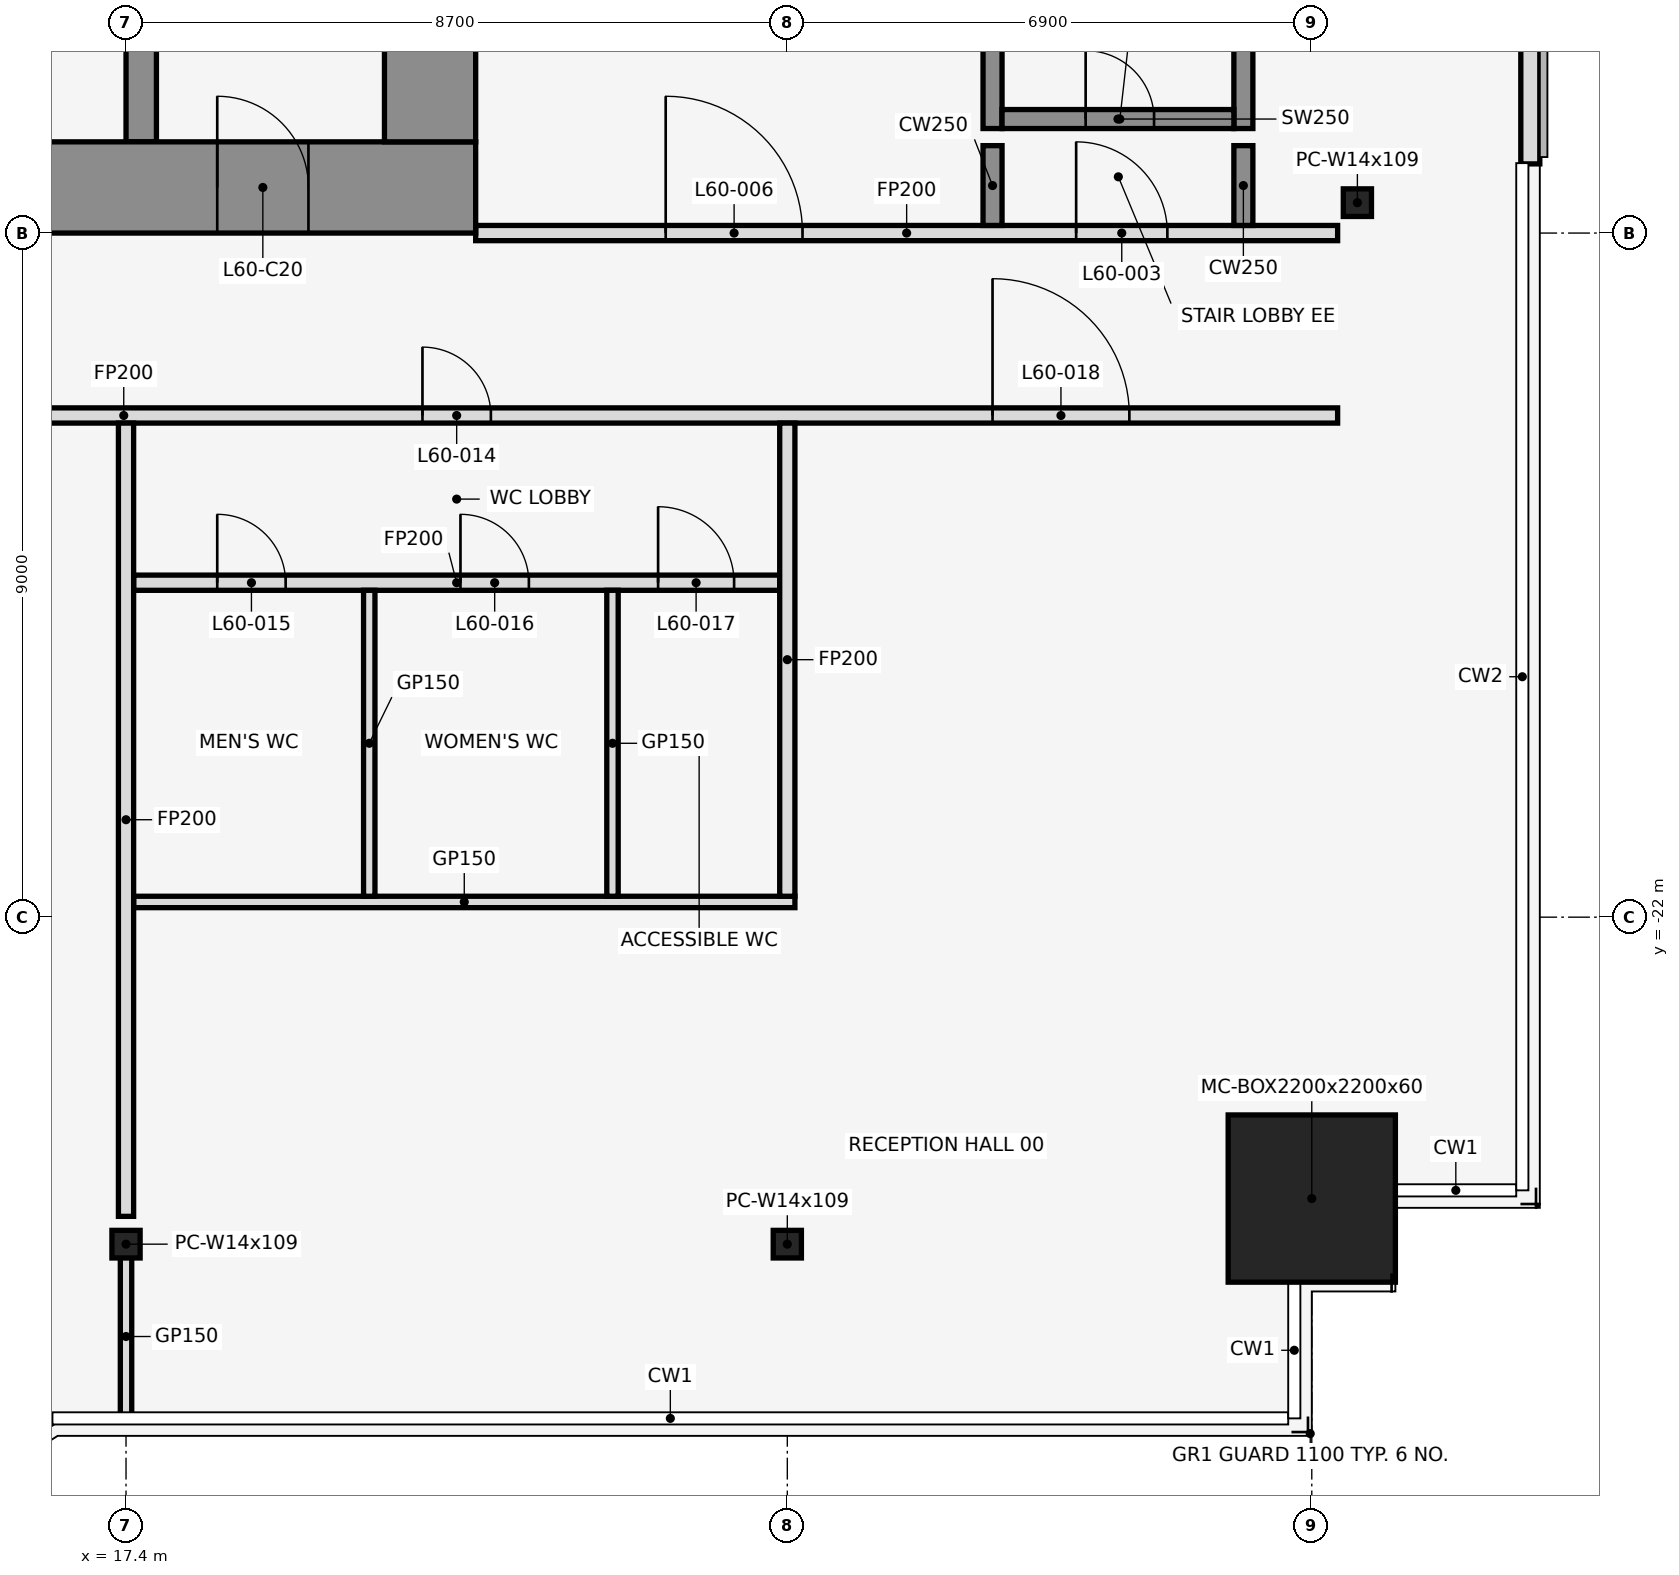
"""IFC4 building model, lengths in metres.
Left out: names, types, materials, properties, quantities, classifications, styles, units other than length and angle.
Written with IfcOpenShell. Run it as: python <this file> out.ifc"""

import sys

from ifc_helpers import new_model, si_unit, direction, frame, frame_2d, origin, origin_2d, place, context, subcontext, project, spatial, rectangle, hollow_rectangle, i_section, extrude, element, fill, save


model = new_model("IFC4")
c1 = context("Model", 3, precision=1e-05, world=origin(), true_north=direction((0.0, 1.0)))
c2 = subcontext(c1, "Body", "Model", "MODEL_VIEW")
j1 = project(units=[si_unit("LENGTHUNIT", "METRE"), si_unit("PLANEANGLEUNIT", "RADIAN")], contexts=[c1])
p1 = place(None, origin())
s1 = spatial("IfcSite", under=j1, at=p1, CompositionType="ELEMENT")
p2 = place(p1, origin())
s2 = spatial("IfcBuilding", under=s1, at=p2, CompositionType="ELEMENT")
p3 = place(p2, frame((0.0, 0.0, 266.6)))
s3 = spatial("IfcBuildingStorey", under=s2, at=p3, CompositionType="ELEMENT", Elevation=266.6)
for number, where, z_axis, x_axis in (
    (1, (17.4, -26.302, 0.0), (0.0, 0.0, 1.0), (1.0, 0.0, 0.0)),
    (2, (26.1, -26.302, 0.0), (0.0, 0.0, 1.0), (1.0, 0.0, 0.0)),
):
    element("IfcColumn", number, at=place(p3, frame(where, z_axis=z_axis, x_axis=x_axis)), inside=s3, PredefinedType="COLUMN", context=c2, shape_type="SweptSolid", body=[
        extrude(i_section(OverallWidth=0.371, OverallDepth=0.363, WebThickness=0.013, FlangeThickness=0.022, at=origin_2d()), origin(), (0.0, 0.0, 1.0), 4.2),
    ])
p4 = place(p3, frame((33.0, -25.702, 0.0), z_axis=(0.0, 0.0, 1.0), x_axis=(1.0, 0.0, 0.0)))
e3 = element("IfcColumn", 3, at=p4, inside=s3, PredefinedType="COLUMN", context=c2, shape_type="SweptSolid", body=[
    extrude(hollow_rectangle(XDim=2.2, YDim=2.2, WallThickness=0.06, at=origin_2d()), origin(), (0.0, 0.0, 1.0), 4.2),
])
p5 = place(p3, frame((33.6, -12.6, 0.0), z_axis=(0.0, 0.0, 1.0), x_axis=(1.0, 0.0, 0.0)))
e4 = element("IfcColumn", 4, at=p5, inside=s3, PredefinedType="COLUMN", context=c2, shape_type="SweptSolid", body=[
    extrude(i_section(OverallWidth=0.371, OverallDepth=0.363, WebThickness=0.013, FlangeThickness=0.022, at=origin_2d()), origin(), (0.0, 0.0, 1.0), 4.2),
])
p6 = place(p3, frame((35.875, -12.09, 0.0), z_axis=(0.0, 0.0, 1.0), x_axis=(0.0, 1.0, 0.0)))
e5 = element("IfcWall", 5, at=p6, inside=s3, PredefinedType="STANDARD", context=c2, shape_type="SweptSolid", body=[
    extrude(rectangle(XDim=9.09, YDim=0.25, at=frame_2d((4.545, 0.0))), origin(), (0.0, 0.0, 1.0), 4.05),
])
p7 = place(p3, frame((28.8, -11.625, 0.0), z_axis=(0.0, 0.0, 1.0), x_axis=(0.0, 1.0, 0.0)))
e6 = element("IfcWall", 6, at=p7, inside=s3, PredefinedType="SHEAR", context=c2, shape_type="SweptSolid", body=[
    extrude(rectangle(XDim=7.25, YDim=0.25, at=frame_2d((3.625, 0.0))), origin(), (0.0, 0.0, 1.0), 4.2),
])
p8 = place(p3, frame((32.1, -11.625, 0.0), z_axis=(0.0, 0.0, 1.0), x_axis=(0.0, 1.0, 0.0)))
e7 = element("IfcWall", 7, at=p8, inside=s3, PredefinedType="SHEAR", context=c2, shape_type="SweptSolid", body=[
    extrude(rectangle(XDim=7.525, YDim=0.25, at=frame_2d((3.762, 0.0))), origin(), (0.0, 0.0, 1.0), 4.2),
])
p9 = place(p3, frame((28.925, -11.5, 0.0), z_axis=(0.0, 0.0, 1.0), x_axis=(1.0, 0.0, 0.0)))
e8 = element("IfcWall", 8, at=p9, inside=s3, PredefinedType="SHEAR", context=c2, shape_type="SweptSolid", body=[
    extrude(rectangle(XDim=3.05, YDim=0.25, at=frame_2d((1.525, 0.0))), origin(), (0.0, 0.0, 1.0), 4.2),
])
p10 = place(p9, frame((1.1, 0.0, 0.0)))
e9 = element("IfcOpeningElement", 9, at=p10, cuts=e8, PredefinedType="OPENING", context=c2, shape_type="SweptSolid", body=[
    extrude(rectangle(XDim=0.9, YDim=2.1, at=frame_2d((0.45, 1.05))), frame((0.0, 0.137, 0.0), z_axis=(0.0, -1.0, 0.0), x_axis=(1.0, 0.0, 0.0)), (0.0, 0.0, 1.0), 0.274),
])
p11 = place(p3, frame((17.5, -21.8, 0.0), z_axis=(0.0, 0.0, 1.0), x_axis=(1.0, 0.0, 0.0)))
e10 = element("IfcWall", 10, at=p11, inside=s3, PredefinedType="PARTITIONING", context=c2, shape_type="SweptSolid", body=[
    extrude(rectangle(XDim=8.7, YDim=0.15, at=frame_2d((4.35, 0.0))), origin(), (0.0, 0.0, 1.0), 3.118),
])
p12 = place(p3, frame((17.5, -17.6, 0.0), z_axis=(0.0, 0.0, 1.0), x_axis=(1.0, 0.0, 0.0)))
e11 = element("IfcWall", 11, at=p12, inside=s3, PredefinedType="PARTITIONING", context=c2, shape_type="SweptSolid", body=[
    extrude(rectangle(XDim=8.5, YDim=0.2, at=frame_2d((4.25, 0.0))), origin(), (0.0, 0.0, 1.0), 3.118),
])
p13 = place(p12, frame((1.1, 0.0, 0.0)))
e12 = element("IfcOpeningElement", 12, at=p13, cuts=e11, PredefinedType="OPENING", context=c2, shape_type="SweptSolid", body=[
    extrude(rectangle(XDim=0.9, YDim=2.1, at=frame_2d((0.45, 1.05))), frame((0.0, 0.112, 0.0), z_axis=(0.0, -1.0, 0.0), x_axis=(1.0, 0.0, 0.0)), (0.0, 0.0, 1.0), 0.224),
])
p14 = place(p12, frame((4.3, 0.0, 0.0)))
e13 = element("IfcOpeningElement", 13, at=p14, cuts=e11, PredefinedType="OPENING", context=c2, shape_type="SweptSolid", body=[
    extrude(rectangle(XDim=0.9, YDim=2.1, at=frame_2d((0.45, 1.05))), frame((0.0, 0.112, 0.0), z_axis=(0.0, -1.0, 0.0), x_axis=(1.0, 0.0, 0.0)), (0.0, 0.0, 1.0), 0.224),
])
p15 = place(p12, frame((6.9, 0.0, 0.0)))
e14 = element("IfcOpeningElement", 14, at=p15, cuts=e11, PredefinedType="OPENING", context=c2, shape_type="SweptSolid", body=[
    extrude(rectangle(XDim=1.0, YDim=2.1, at=frame_2d((0.5, 1.05))), frame((0.0, 0.112, 0.0), z_axis=(0.0, -1.0, 0.0), x_axis=(1.0, 0.0, 0.0)), (0.0, 0.0, 1.0), 0.224),
])
p16 = place(p3, frame((1.4, -15.4, 0.0), z_axis=(0.0, 0.0, 1.0), x_axis=(1.0, 0.0, 0.0)))
e15 = element("IfcWall", 15, at=p16, inside=s3, PredefinedType="PARTITIONING", context=c2, shape_type="SweptSolid", body=[
    extrude(rectangle(XDim=31.94, YDim=0.2, at=frame_2d((15.97, 0.0))), origin(), (0.0, 0.0, 1.0), 3.118),
])
p17 = place(p16, frame((4.2, 0.0, 0.0)))
e16 = element("IfcOpeningElement", 16, at=p17, cuts=e15, PredefinedType="OPENING", context=c2, shape_type="SweptSolid", body=[
    extrude(rectangle(XDim=1.8, YDim=2.1, at=frame_2d((0.9, 1.05))), frame((0.0, 0.112, 0.0), z_axis=(0.0, -1.0, 0.0), x_axis=(1.0, 0.0, 0.0)), (0.0, 0.0, 1.0), 0.224),
])
p18 = place(p16, frame((12.6, 0.0, 0.0)))
e17 = element("IfcOpeningElement", 17, at=p18, cuts=e15, PredefinedType="OPENING", context=c2, shape_type="SweptSolid", body=[
    extrude(rectangle(XDim=1.0, YDim=2.1, at=frame_2d((0.5, 1.05))), frame((0.0, 0.112, 0.0), z_axis=(0.0, -1.0, 0.0), x_axis=(1.0, 0.0, 0.0)), (0.0, 0.0, 1.0), 0.224),
])
p19 = place(p16, frame((19.9, 0.0, 0.0)))
e18 = element("IfcOpeningElement", 18, at=p19, cuts=e15, PredefinedType="OPENING", context=c2, shape_type="SweptSolid", body=[
    extrude(rectangle(XDim=0.9, YDim=2.1, at=frame_2d((0.45, 1.05))), frame((0.0, 0.112, 0.0), z_axis=(0.0, -1.0, 0.0), x_axis=(1.0, 0.0, 0.0)), (0.0, 0.0, 1.0), 0.224),
])
p20 = place(p16, frame((27.4, 0.0, 0.0)))
e19 = element("IfcOpeningElement", 19, at=p20, cuts=e15, PredefinedType="OPENING", context=c2, shape_type="SweptSolid", body=[
    extrude(rectangle(XDim=1.8, YDim=2.1, at=frame_2d((0.9, 1.05))), frame((0.0, 0.112, 0.0), z_axis=(0.0, -1.0, 0.0), x_axis=(1.0, 0.0, 0.0)), (0.0, 0.0, 1.0), 0.224),
])
p21 = place(p3, frame((22.0, -13.0, 0.0), z_axis=(0.0, 0.0, 1.0), x_axis=(1.0, 0.0, 0.0)))
e20 = element("IfcWall", 20, at=p21, inside=s3, PredefinedType="PARTITIONING", context=c2, shape_type="SweptSolid", body=[
    extrude(rectangle(XDim=11.34, YDim=0.2, at=frame_2d((5.67, 0.0))), origin(), (0.0, 0.0, 1.0), 3.118),
])
p22 = place(p21, frame((7.9, 0.0, 0.0)))
e21 = element("IfcOpeningElement", 21, at=p22, cuts=e20, PredefinedType="OPENING", context=c2, shape_type="SweptSolid", body=[
    extrude(rectangle(XDim=1.2, YDim=2.1, at=frame_2d((0.6, 1.05))), frame((0.0, 0.112, 0.0), z_axis=(0.0, -1.0, 0.0), x_axis=(1.0, 0.0, 0.0)), (0.0, 0.0, 1.0), 0.224),
])
p23 = place(p21, frame((2.5, 0.0, 0.0)))
e22 = element("IfcOpeningElement", 22, at=p23, cuts=e20, PredefinedType="OPENING", context=c2, shape_type="SweptSolid", body=[
    extrude(rectangle(XDim=1.8, YDim=2.1, at=frame_2d((0.9, 1.05))), frame((0.0, 0.112, 0.0), z_axis=(0.0, -1.0, 0.0), x_axis=(1.0, 0.0, 0.0)), (0.0, 0.0, 1.0), 0.224),
])
p24 = place(p3, frame((17.4, -28.61, 0.0), z_axis=(0.0, 0.0, 1.0), x_axis=(0.0, 1.0, 0.0)))
e23 = element("IfcWall", 23, at=p24, inside=s3, PredefinedType="PARTITIONING", context=c2, shape_type="SweptSolid", body=[
    extrude(rectangle(XDim=2.186, YDim=0.15, at=frame_2d((1.093, 0.0))), origin(), (0.0, 0.0, 1.0), 3.118),
])
p25 = place(p3, frame((17.4, -25.936, 0.0), z_axis=(0.0, 0.0, 1.0), x_axis=(0.0, 1.0, 0.0)))
e24 = element("IfcWall", 24, at=p25, inside=s3, PredefinedType="PARTITIONING", context=c2, shape_type="SweptSolid", body=[
    extrude(rectangle(XDim=10.436, YDim=0.2, at=frame_2d((5.218, 0.0))), origin(), (0.0, 0.0, 1.0), 3.118),
])
for number, where, z_axis, x_axis in (
    (25, (20.6, -21.725, 0.0), (0.0, 0.0, 1.0), (0.0, 1.0, 0.0)),
    (26, (23.8, -21.725, 0.0), (0.0, 0.0, 1.0), (0.0, 1.0, 0.0)),
):
    element("IfcWall", number, at=place(p3, frame(where, z_axis=z_axis, x_axis=x_axis)), inside=s3, PredefinedType="PARTITIONING", context=c2, shape_type="SweptSolid", body=[
        extrude(rectangle(XDim=4.025, YDim=0.15, at=frame_2d((2.013, 0.0))), origin(), (0.0, 0.0, 1.0), 3.118),
    ])
p26 = place(p3, frame((26.1, -21.725, 0.0), z_axis=(0.0, 0.0, 1.0), x_axis=(0.0, 1.0, 0.0)))
e27 = element("IfcWall", 27, at=p26, inside=s3, PredefinedType="PARTITIONING", context=c2, shape_type="SweptSolid", body=[
    extrude(rectangle(XDim=6.225, YDim=0.2, at=frame_2d((3.113, 0.0))), origin(), (0.0, 0.0, 1.0), 3.118),
])
for number, where, z_axis, x_axis in (
    (28, (28.8, -12.9, 0.0), (0.0, 0.0, 1.0), (0.0, 1.0, 0.0)),
    (29, (32.1, -12.9, 0.0), (0.0, 0.0, 1.0), (0.0, 1.0, 0.0)),
):
    element("IfcWall", number, at=place(p3, frame(where, z_axis=z_axis, x_axis=x_axis)), inside=s3, PredefinedType="SHEAR", context=c2, shape_type="SweptSolid", body=[
        extrude(rectangle(XDim=1.05, YDim=0.25, at=frame_2d((0.525, 0.0))), origin(), (0.0, 0.0, 1.0), 4.2),
    ])
p27 = place(p3, frame((17.6, -11.8, 0.0), z_axis=(0.0, 0.0, 1.0), x_axis=(0.0, 1.0, 0.0)))
e30 = element("IfcWall", 30, at=p27, inside=s3, PredefinedType="SHEAR", context=c2, shape_type="SweptSolid", body=[
    extrude(rectangle(XDim=10.6, YDim=0.4, at=frame_2d((5.3, 0.0))), origin(), (0.0, 0.0, 1.0), 4.2),
])
p28 = place(p27, frame((1.25, 0.0, 0.0)))
e31 = element("IfcOpeningElement", 31, at=p28, cuts=e30, PredefinedType="OPENING", context=c2, shape_type="SweptSolid", body=[
    extrude(rectangle(XDim=1.1, YDim=2.1, at=frame_2d((0.55, 1.05))), frame((0.0, 0.212, 0.0), z_axis=(0.0, -1.0, 0.0), x_axis=(1.0, 0.0, 0.0)), (0.0, 0.0, 1.0), 0.424),
])
p29 = place(p27, frame((3.95, 0.0, 0.0)))
e32 = element("IfcOpeningElement", 32, at=p29, cuts=e30, PredefinedType="OPENING", context=c2, shape_type="SweptSolid", body=[
    extrude(rectangle(XDim=1.1, YDim=2.1, at=frame_2d((0.55, 1.05))), frame((0.0, 0.212, 0.0), z_axis=(0.0, -1.0, 0.0), x_axis=(1.0, 0.0, 0.0)), (0.0, 0.0, 1.0), 0.424),
])
p30 = place(p3, frame((-22.0, -12.4, 0.0), z_axis=(0.0, 0.0, 1.0), x_axis=(1.0, 0.0, 0.0)))
e33 = element("IfcWall", 33, at=p30, inside=s3, PredefinedType="SHEAR", context=c2, shape_type="SweptSolid", body=[
    extrude(rectangle(XDim=44.0, YDim=1.2, at=frame_2d((22.0, 0.0))), origin(), (0.0, 0.0, 1.0), 4.2),
])
p31 = place(p30, frame((2.2, 0.0, 0.0)))
e34 = element("IfcOpeningElement", 34, at=p31, cuts=e33, PredefinedType="OPENING", context=c2, shape_type="SweptSolid", body=[
    extrude(rectangle(XDim=1.2, YDim=2.1, at=frame_2d((0.6, 1.05))), frame((0.0, 0.612, 0.0), z_axis=(0.0, -1.0, 0.0), x_axis=(1.0, 0.0, 0.0)), (0.0, 0.0, 1.0), 1.224),
])
p32 = place(p30, frame((21.4, 0.0, 0.0)))
e35 = element("IfcOpeningElement", 35, at=p32, cuts=e33, PredefinedType="OPENING", context=c2, shape_type="SweptSolid", body=[
    extrude(rectangle(XDim=1.2, YDim=2.1, at=frame_2d((0.6, 1.05))), frame((0.0, 0.612, 0.0), z_axis=(0.0, -1.0, 0.0), x_axis=(1.0, 0.0, 0.0)), (0.0, 0.0, 1.0), 1.224),
])
p33 = place(p30, frame((40.6, 0.0, 0.0)))
e36 = element("IfcOpeningElement", 36, at=p33, cuts=e33, PredefinedType="OPENING", context=c2, shape_type="SweptSolid", body=[
    extrude(rectangle(XDim=1.2, YDim=2.1, at=frame_2d((0.6, 1.05))), frame((0.0, 0.612, 0.0), z_axis=(0.0, -1.0, 0.0), x_axis=(1.0, 0.0, 0.0)), (0.0, 0.0, 1.0), 1.224),
])
p34 = place(p30, frame((16.0, 0.0, 0.0)))
e37 = element("IfcOpeningElement", 37, at=p34, cuts=e33, PredefinedType="OPENING", context=c2, shape_type="SweptSolid", body=[
    extrude(rectangle(XDim=1.8, YDim=2.1, at=frame_2d((0.9, 1.05))), frame((0.0, 0.612, 0.0), z_axis=(0.0, -1.0, 0.0), x_axis=(1.0, 0.0, 0.0)), (0.0, 0.0, 1.0), 1.224),
])
p35 = place(p30, frame((6.3, 0.0, 0.0)))
e38 = element("IfcOpeningElement", 38, at=p35, cuts=e33, PredefinedType="OPENING", context=c2, shape_type="SweptSolid", body=[
    extrude(rectangle(XDim=1.2, YDim=2.1, at=frame_2d((0.6, 1.05))), frame((0.0, 0.612, 0.0), z_axis=(0.0, -1.0, 0.0), x_axis=(1.0, 0.0, 0.0)), (0.0, 0.0, 1.0), 1.224),
])
p36 = place(p30, frame((26.2, 0.0, 0.0)))
e39 = element("IfcOpeningElement", 39, at=p36, cuts=e33, PredefinedType="OPENING", context=c2, shape_type="SweptSolid", body=[
    extrude(rectangle(XDim=1.8, YDim=2.1, at=frame_2d((0.9, 1.05))), frame((0.0, 0.612, 0.0), z_axis=(0.0, -1.0, 0.0), x_axis=(1.0, 0.0, 0.0)), (0.0, 0.0, 1.0), 1.224),
])
p37 = place(p30, frame((36.5, 0.0, 0.0)))
e40 = element("IfcOpeningElement", 40, at=p37, cuts=e33, PredefinedType="OPENING", context=c2, shape_type="SweptSolid", body=[
    extrude(rectangle(XDim=1.2, YDim=2.1, at=frame_2d((0.6, 1.05))), frame((0.0, 0.612, 0.0), z_axis=(0.0, -1.0, 0.0), x_axis=(1.0, 0.0, 0.0)), (0.0, 0.0, 1.0), 1.224),
])
p38 = place(p3, frame((21.4, -11.8, 0.0), z_axis=(0.0, 0.0, 1.0), x_axis=(0.0, 1.0, 0.0)))
e41 = element("IfcWall", 41, at=p38, inside=s3, PredefinedType="SHEAR", context=c2, shape_type="SweptSolid", body=[
    extrude(rectangle(XDim=10.6, YDim=1.2, at=frame_2d((5.3, 0.0))), origin(), (0.0, 0.0, 1.0), 4.2),
])
p39 = place(p22, origin())
e42 = element("IfcDoor", 42, at=p39, inside=s3, OperationType="SINGLE_SWING_RIGHT", PredefinedType="DOOR", context=c2, shape_type="SweptSolid", body=[
    extrude(rectangle(XDim=1.2, YDim=2.1, at=frame_2d((0.6, 1.05))), frame((0.0, 0.025, 0.0), z_axis=(0.0, -1.0, 0.0), x_axis=(1.0, 0.0, 0.0)), (0.0, 0.0, 1.0), 0.05),
])
fill(e21, e42)
p40 = place(p10, origin())
e43 = element("IfcDoor", 43, at=p40, inside=s3, OperationType="SINGLE_SWING_LEFT", PredefinedType="DOOR", context=c2, shape_type="SweptSolid", body=[
    extrude(rectangle(XDim=0.9, YDim=2.1, at=frame_2d((0.45, 1.05))), frame((0.0, 0.025, 0.0), z_axis=(0.0, -1.0, 0.0), x_axis=(1.0, 0.0, 0.0)), (0.0, 0.0, 1.0), 0.05),
])
fill(e9, e43)
p41 = place(p23, origin())
e44 = element("IfcDoor", 44, at=p41, inside=s3, OperationType="SINGLE_SWING_LEFT", PredefinedType="DOOR", context=c2, shape_type="SweptSolid", body=[
    extrude(rectangle(XDim=1.8, YDim=2.1, at=frame_2d((0.9, 1.05))), frame((0.0, 0.025, 0.0), z_axis=(0.0, -1.0, 0.0), x_axis=(1.0, 0.0, 0.0)), (0.0, 0.0, 1.0), 0.05),
])
fill(e22, e44)
p42 = place(p19, frame((0.9, 0.0, 0.0), z_axis=(0.0, 0.0, 1.0), x_axis=(-1.0, 0.0, 0.0)))
e45 = element("IfcDoor", 45, at=p42, inside=s3, OperationType="SINGLE_SWING_RIGHT", PredefinedType="DOOR", context=c2, shape_type="SweptSolid", body=[
    extrude(rectangle(XDim=0.9, YDim=2.1, at=frame_2d((0.45, 1.05))), frame((0.0, 0.025, 0.0), z_axis=(0.0, -1.0, 0.0), x_axis=(1.0, 0.0, 0.0)), (0.0, 0.0, 1.0), 0.05),
])
fill(e18, e45)
p43 = place(p13, frame((0.9, 0.0, 0.0), z_axis=(0.0, 0.0, 1.0), x_axis=(-1.0, 0.0, 0.0)))
e46 = element("IfcDoor", 46, at=p43, inside=s3, OperationType="SINGLE_SWING_RIGHT", PredefinedType="DOOR", context=c2, shape_type="SweptSolid", body=[
    extrude(rectangle(XDim=0.9, YDim=2.1, at=frame_2d((0.45, 1.05))), frame((0.0, 0.025, 0.0), z_axis=(0.0, -1.0, 0.0), x_axis=(1.0, 0.0, 0.0)), (0.0, 0.0, 1.0), 0.05),
])
fill(e12, e46)
p44 = place(p14, frame((0.9, 0.0, 0.0), z_axis=(0.0, 0.0, 1.0), x_axis=(-1.0, 0.0, 0.0)))
e47 = element("IfcDoor", 47, at=p44, inside=s3, OperationType="SINGLE_SWING_LEFT", PredefinedType="DOOR", context=c2, shape_type="SweptSolid", body=[
    extrude(rectangle(XDim=0.9, YDim=2.1, at=frame_2d((0.45, 1.05))), frame((0.0, 0.025, 0.0), z_axis=(0.0, -1.0, 0.0), x_axis=(1.0, 0.0, 0.0)), (0.0, 0.0, 1.0), 0.05),
])
fill(e13, e47)
p45 = place(p15, frame((1.0, 0.0, 0.0), z_axis=(0.0, 0.0, 1.0), x_axis=(-1.0, 0.0, 0.0)))
e48 = element("IfcDoor", 48, at=p45, inside=s3, OperationType="SINGLE_SWING_RIGHT", PredefinedType="DOOR", context=c2, shape_type="SweptSolid", body=[
    extrude(rectangle(XDim=1.0, YDim=2.1, at=frame_2d((0.5, 1.05))), frame((0.0, 0.025, 0.0), z_axis=(0.0, -1.0, 0.0), x_axis=(1.0, 0.0, 0.0)), (0.0, 0.0, 1.0), 0.05),
])
fill(e14, e48)
p46 = place(p20, origin())
e49 = element("IfcDoor", 49, at=p46, inside=s3, OperationType="SINGLE_SWING_LEFT", PredefinedType="DOOR", context=c2, shape_type="SweptSolid", body=[
    extrude(rectangle(XDim=1.8, YDim=2.1, at=frame_2d((0.9, 1.05))), frame((0.0, 0.025, 0.0), z_axis=(0.0, -1.0, 0.0), x_axis=(1.0, 0.0, 0.0)), (0.0, 0.0, 1.0), 0.05),
])
fill(e19, e49)
p47 = place(p33, frame((1.2, 0.0, 0.0), z_axis=(0.0, 0.0, 1.0), x_axis=(-1.0, 0.0, 0.0)))
e50 = element("IfcDoor", 50, at=p47, inside=s3, OperationType="SINGLE_SWING_RIGHT", PredefinedType="DOOR", context=c2, shape_type="SweptSolid", body=[
    extrude(rectangle(XDim=1.2, YDim=2.1, at=frame_2d((0.6, 1.05))), frame((0.0, 0.025, 0.0), z_axis=(0.0, -1.0, 0.0), x_axis=(1.0, 0.0, 0.0)), (0.0, 0.0, 1.0), 0.05),
])
fill(e36, e50)
save(model, sys.argv[1])
